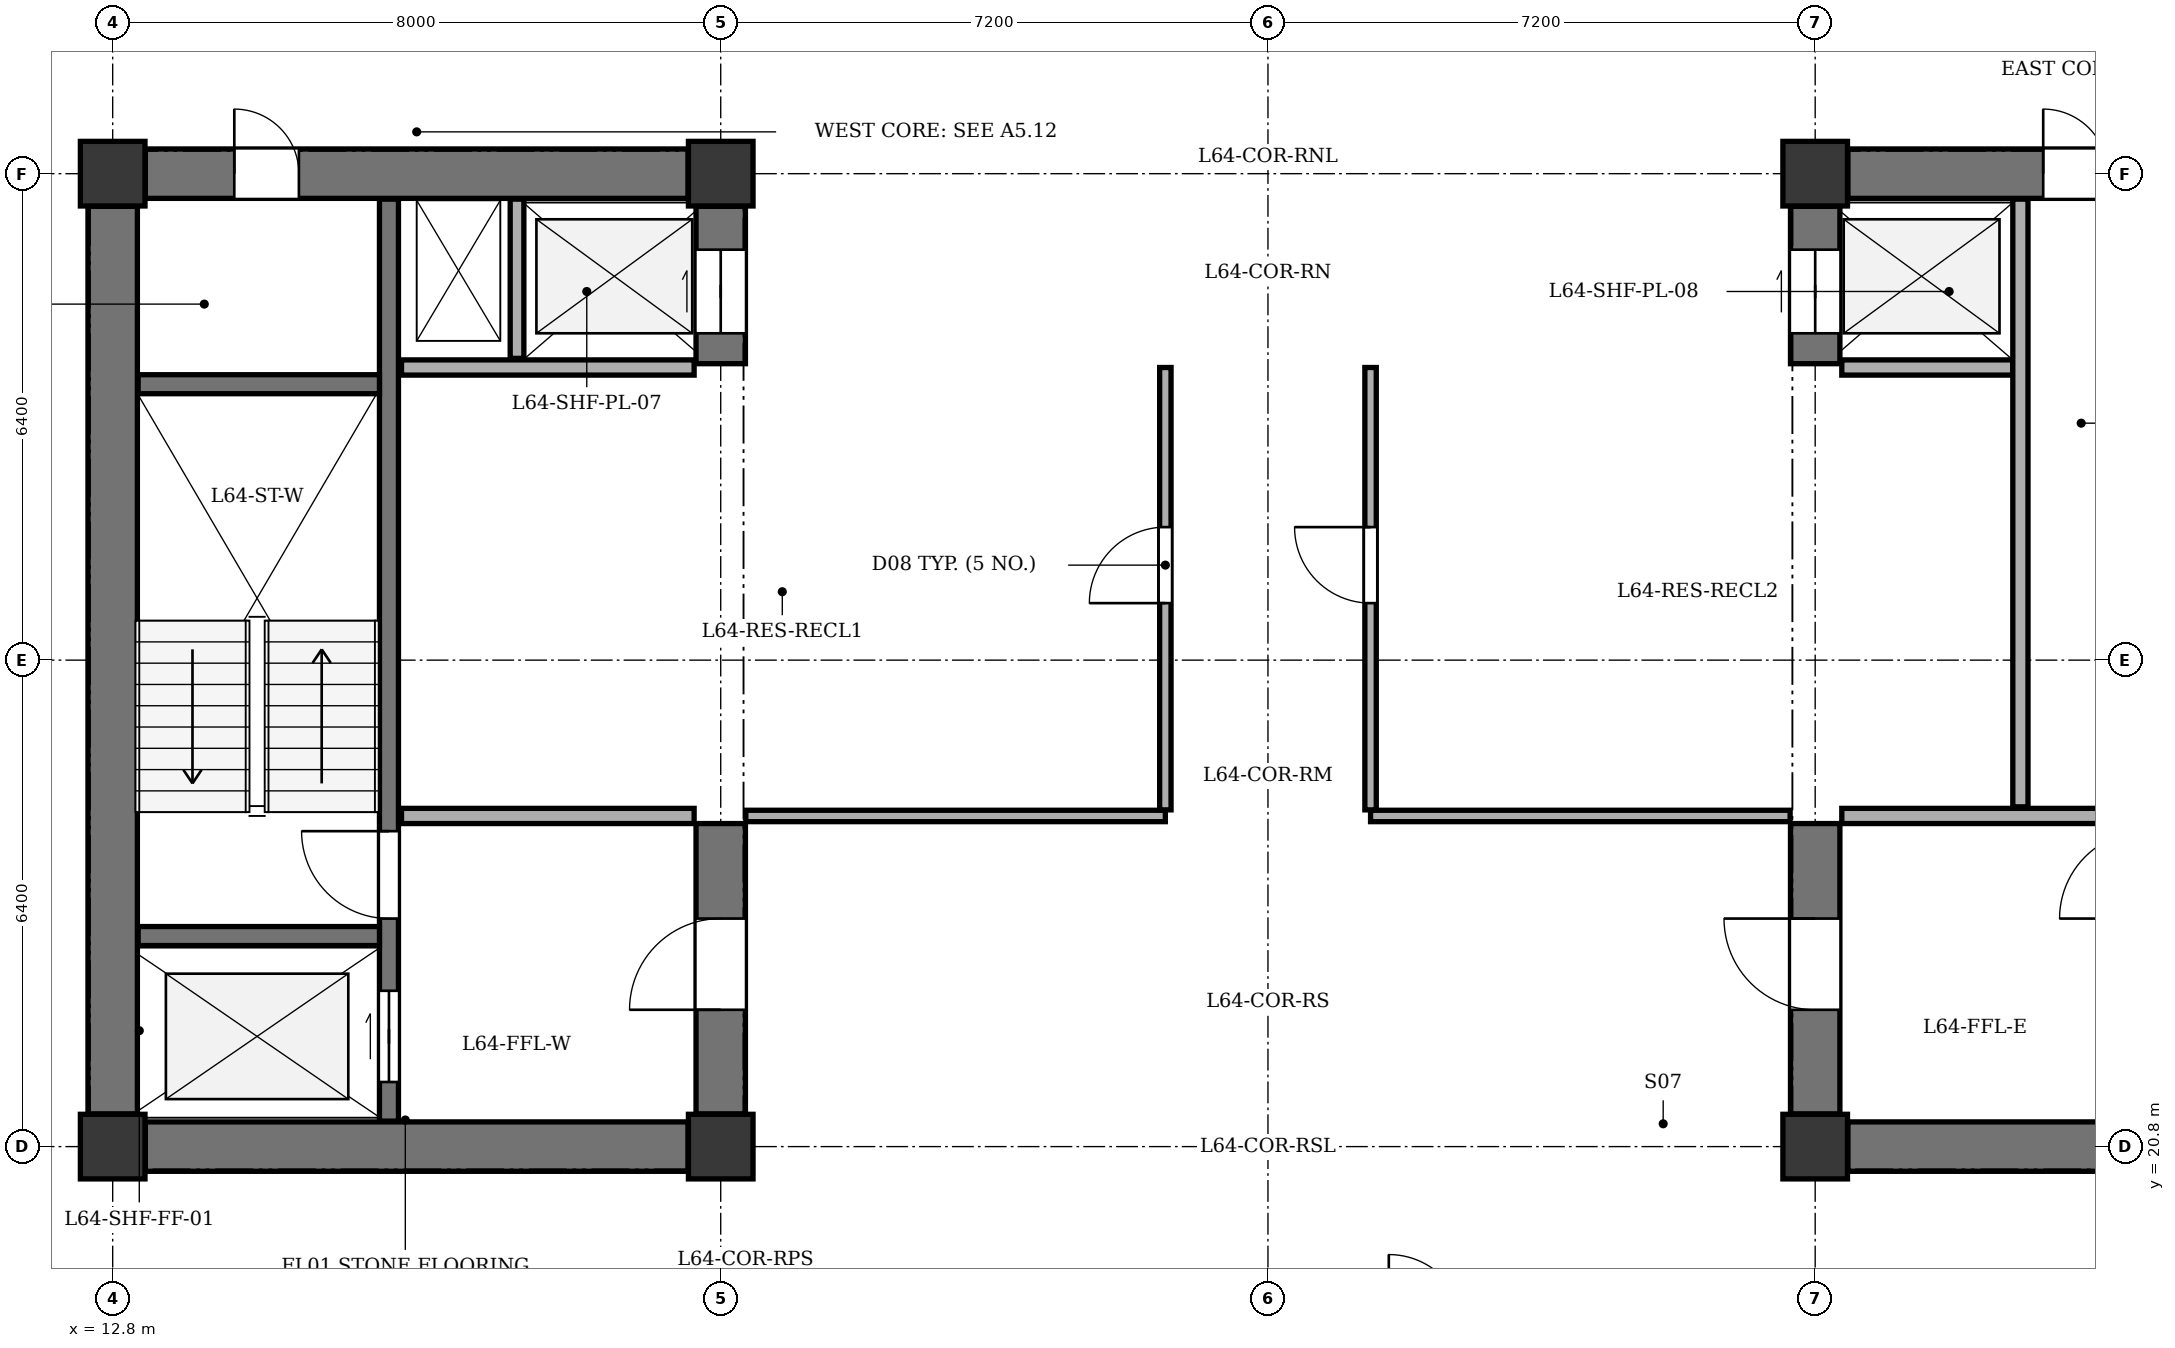
"""IFC4 building model, lengths in metres.
Left out: names, types, materials, properties, quantities, classifications, styles, units other than length and angle.
Written with IfcOpenShell. Run it as: python <this file> out.ifc"""

import sys

from ifc_helpers import new_model, si_unit, direction, frame, frame_2d, origin, origin_2d, place, context, subcontext, project, spatial, rectangle, extrude, element, fill, save


model = new_model("IFC4")
c1 = context("Model", 3, precision=1e-05, world=origin(), true_north=direction((0.0, 1.0)))
c2 = subcontext(c1, "Body", "Model", "MODEL_VIEW")
j1 = project(units=[si_unit("LENGTHUNIT", "METRE"), si_unit("PLANEANGLEUNIT", "RADIAN")], contexts=[c1])
p1 = place(None, origin())
s1 = spatial("IfcSite", under=j1, at=p1, CompositionType="ELEMENT")
p2 = place(p1, origin())
s2 = spatial("IfcBuilding", under=s1, at=p2, CompositionType="ELEMENT")
p3 = place(p2, frame((0.0, 0.0, 244.9)))
s3 = spatial("IfcBuildingStorey", under=s2, at=p3, CompositionType="ELEMENT", Elevation=244.9)
for number, where, z_axis, x_axis in (
    (1, (12.8, 20.8, 0.0), (0.0, 0.0, 1.0), (1.0, 0.0, 0.0)),
    (2, (20.8, 20.8, 0.0), (0.0, 0.0, 1.0), (1.0, 0.0, 0.0)),
    (3, (12.8, 33.6, 0.0), (0.0, 0.0, 1.0), (1.0, 0.0, 0.0)),
    (4, (20.8, 33.6, 0.0), (0.0, 0.0, 1.0), (1.0, 0.0, 0.0)),
    (5, (35.2, 20.8, 0.0), (0.0, 0.0, 1.0), (1.0, 0.0, 0.0)),
    (6, (35.2, 33.6, 0.0), (0.0, 0.0, 1.0), (1.0, 0.0, 0.0)),
):
    element("IfcColumn", number, at=place(p3, frame(where, z_axis=z_axis, x_axis=x_axis)), inside=s3, PredefinedType="COLUMN", context=c2, shape_type="SweptSolid", body=[
        extrude(rectangle(XDim=0.85, YDim=0.85, at=origin_2d()), origin(), (0.0, 0.0, 1.0), 3.4),
    ])
p4 = place(p3, frame((10.88, 35.0, 0.0), z_axis=(0.0, 0.0, 1.0), x_axis=(0.707106781187, 0.707106781187, 0.0)))
e7 = element("IfcWall", 7, at=p4, inside=s3, PredefinedType="STANDARD", context=c2, shape_type="SweptSolid", body=[
    extrude(rectangle(XDim=6.11, YDim=0.32, at=frame_2d((3.055, 0.0))), origin(), (0.0, 0.0, 1.0), 2.335),
])
p5 = place(p4, frame((2.355, 0.0, 0.75)))
e8 = element("IfcOpeningElement", 8, at=p5, cuts=e7, PredefinedType="OPENING", context=c2, shape_type="SweptSolid", body=[
    extrude(rectangle(XDim=1.4, YDim=1.465, at=frame_2d((0.7, 0.732))), frame((0.0, 0.17, 0.0), z_axis=(0.0, -1.0, 0.0), x_axis=(1.0, 0.0, 0.0)), (0.0, 0.0, 1.0), 0.34),
])
p6 = place(p3, frame((12.8, 21.23, 0.0), z_axis=(0.0, 0.0, 1.0), x_axis=(0.0, 1.0, 0.0)))
e9 = element("IfcWall", 9, at=p6, inside=s3, PredefinedType="SHEAR", context=c2, shape_type="SweptSolid", body=[
    extrude(rectangle(XDim=11.94, YDim=0.65, at=frame_2d((5.97, 0.0))), origin(), (0.0, 0.0, 1.0), 2.95),
])
p7 = place(p3, frame((13.23, 20.8, 0.0), z_axis=(0.0, 0.0, 1.0), x_axis=(1.0, 0.0, 0.0)))
e10 = element("IfcWall", 10, at=p7, inside=s3, PredefinedType="SHEAR", context=c2, shape_type="SweptSolid", body=[
    extrude(rectangle(XDim=7.14, YDim=0.65, at=frame_2d((3.57, 0.0))), origin(), (0.0, 0.0, 1.0), 2.95),
])
p8 = place(p3, frame((13.23, 33.6, 0.0), z_axis=(0.0, 0.0, 1.0), x_axis=(1.0, 0.0, 0.0)))
e11 = element("IfcWall", 11, at=p8, inside=s3, PredefinedType="SHEAR", context=c2, shape_type="SweptSolid", body=[
    extrude(rectangle(XDim=7.14, YDim=0.65, at=frame_2d((3.57, 0.0))), origin(), (0.0, 0.0, 1.0), 2.95),
])
p9 = place(p8, frame((1.17, 0.0, 0.0)))
e12 = element("IfcOpeningElement", 12, at=p9, cuts=e11, PredefinedType="OPENING", context=c2, shape_type="SweptSolid", body=[
    extrude(rectangle(XDim=0.85, YDim=2.02, at=frame_2d((0.425, 1.01))), frame((0.0, 0.335, 0.0), z_axis=(0.0, -1.0, 0.0), x_axis=(1.0, 0.0, 0.0)), (0.0, 0.0, 1.0), 0.67),
])
p10 = place(p3, frame((20.8, 21.23, 0.0), z_axis=(0.0, 0.0, 1.0), x_axis=(0.0, 1.0, 0.0)))
e13 = element("IfcWall", 13, at=p10, inside=s3, PredefinedType="SHEAR", context=c2, shape_type="SweptSolid", body=[
    extrude(rectangle(XDim=3.82, YDim=0.65, at=frame_2d((1.91, 0.0))), origin(), (0.0, 0.0, 1.0), 2.95),
])
p11 = place(p10, frame((1.37, 0.0, 0.0)))
e14 = element("IfcOpeningElement", 14, at=p11, cuts=e13, PredefinedType="OPENING", context=c2, shape_type="SweptSolid", body=[
    extrude(rectangle(XDim=1.2, YDim=2.15, at=frame_2d((0.6, 1.075))), frame((0.0, 0.335, 0.0), z_axis=(0.0, -1.0, 0.0), x_axis=(1.0, 0.0, 0.0)), (0.0, 0.0, 1.0), 0.67),
])
p12 = place(p3, frame((20.8, 31.1, 0.0), z_axis=(0.0, 0.0, 1.0), x_axis=(0.0, 1.0, 0.0)))
e15 = element("IfcWall", 15, at=p12, inside=s3, PredefinedType="SHEAR", context=c2, shape_type="SweptSolid", body=[
    extrude(rectangle(XDim=2.07, YDim=0.65, at=frame_2d((1.035, 0.0))), origin(), (0.0, 0.0, 1.0), 2.95),
])
p13 = place(p12, frame((0.4, 0.0, 0.0)))
e16 = element("IfcOpeningElement", 16, at=p13, cuts=e15, PredefinedType="OPENING", context=c2, shape_type="SweptSolid", body=[
    extrude(rectangle(XDim=1.1, YDim=2.1, at=frame_2d((0.55, 1.05))), frame((0.0, 0.335, 0.0), z_axis=(0.0, -1.0, 0.0), x_axis=(1.0, 0.0, 0.0)), (0.0, 0.0, 1.0), 0.67),
])
p14 = place(p3, frame((16.435, 21.135, 0.0), z_axis=(0.0, 0.0, 1.0), x_axis=(0.0, 1.0, 0.0)))
e17 = element("IfcWall", 17, at=p14, inside=s3, PredefinedType="SHEAR", context=c2, shape_type="SweptSolid", body=[
    extrude(rectangle(XDim=12.13, YDim=0.25, at=frame_2d((6.065, 0.0))), origin(), (0.0, 0.0, 1.0), 2.95),
])
p15 = place(p14, frame((0.515, 0.0, 0.0)))
e18 = element("IfcOpeningElement", 18, at=p15, cuts=e17, PredefinedType="OPENING", context=c2, shape_type="SweptSolid", body=[
    extrude(rectangle(XDim=1.2, YDim=2.15, at=frame_2d((0.6, 1.075))), frame((0.0, 0.135, 0.0), z_axis=(0.0, -1.0, 0.0), x_axis=(1.0, 0.0, 0.0)), (0.0, 0.0, 1.0), 0.27),
])
p16 = place(p14, frame((2.665, 0.0, 0.0)))
e19 = element("IfcOpeningElement", 19, at=p16, cuts=e17, PredefinedType="OPENING", context=c2, shape_type="SweptSolid", body=[
    extrude(rectangle(XDim=1.15, YDim=2.15, at=frame_2d((0.575, 1.075))), frame((0.0, 0.135, 0.0), z_axis=(0.0, -1.0, 0.0), x_axis=(1.0, 0.0, 0.0)), (0.0, 0.0, 1.0), 0.27),
])
for number, where, z_axis, x_axis in (
    (20, (13.135, 23.57, 0.0), (0.0, 0.0, 1.0), (1.0, 0.0, 0.0)),
    (21, (13.135, 30.83, 0.0), (0.0, 0.0, 1.0), (1.0, 0.0, 0.0)),
):
    element("IfcWall", number, at=place(p3, frame(where, z_axis=z_axis, x_axis=x_axis)), inside=s3, PredefinedType="SHEAR", context=c2, shape_type="SweptSolid", body=[
        extrude(rectangle(XDim=3.175, YDim=0.25, at=frame_2d((1.587, 0.0))), origin(), (0.0, 0.0, 1.0), 2.95),
    ])
for number, where, z_axis, x_axis in (
    (22, (16.6, 25.15, 0.0), (0.0, 0.0, 1.0), (1.0, 0.0, 0.0)),
    (23, (16.6, 31.05, 0.0), (0.0, 0.0, 1.0), (1.0, 0.0, 0.0)),
):
    element("IfcWall", number, at=place(p3, frame(where, z_axis=z_axis, x_axis=x_axis)), inside=s3, PredefinedType="SOLIDWALL", context=c2, shape_type="SweptSolid", body=[
        extrude(rectangle(XDim=3.85, YDim=0.2, at=frame_2d((1.925, 0.0))), origin(), (0.0, 0.0, 1.0), 2.95),
    ])
p17 = place(p3, frame((18.12, 31.17, 0.0), z_axis=(0.0, 0.0, 1.0), x_axis=(0.0, 1.0, 0.0)))
e24 = element("IfcWall", 24, at=p17, inside=s3, PredefinedType="PARTITIONING", context=c2, shape_type="SweptSolid", body=[
    extrude(rectangle(XDim=2.095, YDim=0.18, at=frame_2d((1.047, 0.0))), origin(), (0.0, 0.0, 1.0), 2.95),
])
p18 = place(p3, frame((35.63, 20.8, 0.0), z_axis=(0.0, 0.0, 1.0), x_axis=(1.0, 0.0, 0.0)))
e25 = element("IfcWall", 25, at=p18, inside=s3, PredefinedType="SHEAR", context=c2, shape_type="SweptSolid", body=[
    extrude(rectangle(XDim=7.14, YDim=0.65, at=frame_2d((3.57, 0.0))), origin(), (0.0, 0.0, 1.0), 2.95),
])
p19 = place(p3, frame((35.63, 33.6, 0.0), z_axis=(0.0, 0.0, 1.0), x_axis=(1.0, 0.0, 0.0)))
e26 = element("IfcWall", 26, at=p19, inside=s3, PredefinedType="SHEAR", context=c2, shape_type="SweptSolid", body=[
    extrude(rectangle(XDim=7.14, YDim=0.65, at=frame_2d((3.57, 0.0))), origin(), (0.0, 0.0, 1.0), 2.95),
])
p20 = place(p19, frame((4.77, 0.0, 0.0)))
e27 = element("IfcOpeningElement", 27, at=p20, cuts=e26, PredefinedType="OPENING", context=c2, shape_type="SweptSolid", body=[
    extrude(rectangle(XDim=1.3, YDim=2.15, at=frame_2d((0.65, 1.075))), frame((0.0, 0.335, 0.0), z_axis=(0.0, -1.0, 0.0), x_axis=(1.0, 0.0, 0.0)), (0.0, 0.0, 1.0), 0.67),
])
p21 = place(p19, frame((2.57, 0.0, 0.0)))
e28 = element("IfcOpeningElement", 28, at=p21, cuts=e26, PredefinedType="OPENING", context=c2, shape_type="SweptSolid", body=[
    extrude(rectangle(XDim=0.85, YDim=2.02, at=frame_2d((0.425, 1.01))), frame((0.0, 0.335, 0.0), z_axis=(0.0, -1.0, 0.0), x_axis=(1.0, 0.0, 0.0)), (0.0, 0.0, 1.0), 0.67),
])
p22 = place(p3, frame((35.2, 21.23, 0.0), z_axis=(0.0, 0.0, 1.0), x_axis=(0.0, 1.0, 0.0)))
e29 = element("IfcWall", 29, at=p22, inside=s3, PredefinedType="SHEAR", context=c2, shape_type="SweptSolid", body=[
    extrude(rectangle(XDim=3.82, YDim=0.65, at=frame_2d((1.91, 0.0))), origin(), (0.0, 0.0, 1.0), 2.95),
])
p23 = place(p22, frame((1.37, 0.0, 0.0)))
e30 = element("IfcOpeningElement", 30, at=p23, cuts=e29, PredefinedType="OPENING", context=c2, shape_type="SweptSolid", body=[
    extrude(rectangle(XDim=1.2, YDim=2.15, at=frame_2d((0.6, 1.075))), frame((0.0, 0.335, 0.0), z_axis=(0.0, -1.0, 0.0), x_axis=(1.0, 0.0, 0.0)), (0.0, 0.0, 1.0), 0.67),
])
p24 = place(p3, frame((35.2, 31.1, 0.0), z_axis=(0.0, 0.0, 1.0), x_axis=(0.0, 1.0, 0.0)))
e31 = element("IfcWall", 31, at=p24, inside=s3, PredefinedType="SHEAR", context=c2, shape_type="SweptSolid", body=[
    extrude(rectangle(XDim=2.07, YDim=0.65, at=frame_2d((1.035, 0.0))), origin(), (0.0, 0.0, 1.0), 2.95),
])
p25 = place(p24, frame((0.4, 0.0, 0.0)))
e32 = element("IfcOpeningElement", 32, at=p25, cuts=e31, PredefinedType="OPENING", context=c2, shape_type="SweptSolid", body=[
    extrude(rectangle(XDim=1.1, YDim=2.1, at=frame_2d((0.55, 1.05))), frame((0.0, 0.335, 0.0), z_axis=(0.0, -1.0, 0.0), x_axis=(1.0, 0.0, 0.0)), (0.0, 0.0, 1.0), 0.67),
])
p26 = place(p3, frame((35.55, 25.15, 0.0), z_axis=(0.0, 0.0, 1.0), x_axis=(1.0, 0.0, 0.0)))
e33 = element("IfcWall", 33, at=p26, inside=s3, PredefinedType="SOLIDWALL", context=c2, shape_type="SweptSolid", body=[
    extrude(rectangle(XDim=3.85, YDim=0.2, at=frame_2d((1.925, 0.0))), origin(), (0.0, 0.0, 1.0), 2.95),
])
p27 = place(p3, frame((35.55, 31.05, 0.0), z_axis=(0.0, 0.0, 1.0), x_axis=(1.0, 0.0, 0.0)))
e34 = element("IfcWall", 34, at=p27, inside=s3, PredefinedType="SOLIDWALL", context=c2, shape_type="SweptSolid", body=[
    extrude(rectangle(XDim=2.25, YDim=0.2, at=frame_2d((1.125, 0.0))), origin(), (0.0, 0.0, 1.0), 2.95),
])
p28 = place(p3, frame((37.9, 25.27, 0.0), z_axis=(0.0, 0.0, 1.0), x_axis=(0.0, 1.0, 0.0)))
e35 = element("IfcWall", 35, at=p28, inside=s3, PredefinedType="SOLIDWALL", context=c2, shape_type="SweptSolid", body=[
    extrude(rectangle(XDim=7.995, YDim=0.2, at=frame_2d((3.998, 0.0))), origin(), (0.0, 0.0, 1.0), 2.95),
])
for number, where, z_axis, x_axis in (
    (36, (21.13, 25.15, 0.0), (0.0, 0.0, 1.0), (1.0, 0.0, 0.0)),
    (37, (29.35, 25.15, 0.0), (0.0, 0.0, 1.0), (1.0, 0.0, 0.0)),
):
    element("IfcWall", number, at=place(p3, frame(where, z_axis=z_axis, x_axis=x_axis)), inside=s3, PredefinedType="PARTITIONING", context=c2, shape_type="SweptSolid", body=[
        extrude(rectangle(XDim=5.52, YDim=0.15, at=frame_2d((2.76, 0.0))), origin(), (0.0, 0.0, 1.0), 2.95),
    ])
p29 = place(p3, frame((26.65, 25.23, 0.0), z_axis=(0.0, 0.0, 1.0), x_axis=(0.0, 1.0, 0.0)))
e38 = element("IfcWall", 38, at=p29, inside=s3, PredefinedType="PARTITIONING", context=c2, shape_type="SweptSolid", body=[
    extrude(rectangle(XDim=5.82, YDim=0.15, at=frame_2d((2.91, 0.0))), origin(), (0.0, 0.0, 1.0), 2.95),
])
p30 = place(p29, frame((2.72, 0.0, 0.0)))
e39 = element("IfcOpeningElement", 39, at=p30, cuts=e38, PredefinedType="OPENING", context=c2, shape_type="SweptSolid", body=[
    extrude(rectangle(XDim=1.0, YDim=2.1, at=frame_2d((0.5, 1.05))), frame((0.0, 0.085, 0.0), z_axis=(0.0, -1.0, 0.0), x_axis=(1.0, 0.0, 0.0)), (0.0, 0.0, 1.0), 0.17),
])
p31 = place(p3, frame((29.35, 25.23, 0.0), z_axis=(0.0, 0.0, 1.0), x_axis=(0.0, 1.0, 0.0)))
e40 = element("IfcWall", 40, at=p31, inside=s3, PredefinedType="PARTITIONING", context=c2, shape_type="SweptSolid", body=[
    extrude(rectangle(XDim=5.82, YDim=0.15, at=frame_2d((2.91, 0.0))), origin(), (0.0, 0.0, 1.0), 2.95),
])
p32 = place(p31, frame((2.72, 0.0, 0.0)))
e41 = element("IfcOpeningElement", 41, at=p32, cuts=e40, PredefinedType="OPENING", context=c2, shape_type="SweptSolid", body=[
    extrude(rectangle(XDim=1.0, YDim=2.1, at=frame_2d((0.5, 1.05))), frame((0.0, 0.085, 0.0), z_axis=(0.0, -1.0, 0.0), x_axis=(1.0, 0.0, 0.0)), (0.0, 0.0, 1.0), 0.17),
])
p33 = place(p9, origin())
e42 = element("IfcDoor", 42, at=p33, inside=s3, OperationType="SINGLE_SWING_LEFT", PredefinedType="DOOR", context=c2, shape_type="SweptSolid", body=[
    extrude(rectangle(XDim=0.85, YDim=2.02, at=frame_2d((0.425, 1.01))), frame((0.0, 0.025, 0.0), z_axis=(0.0, -1.0, 0.0), x_axis=(1.0, 0.0, 0.0)), (0.0, 0.0, 1.0), 0.05),
])
fill(e12, e42)
p34 = place(p11, origin())
e43 = element("IfcDoor", 43, at=p34, inside=s3, OperationType="SINGLE_SWING_LEFT", PredefinedType="DOOR", context=c2, shape_type="SweptSolid", body=[
    extrude(rectangle(XDim=1.2, YDim=2.15, at=frame_2d((0.6, 1.075))), frame((0.0, 0.025, 0.0), z_axis=(0.0, -1.0, 0.0), x_axis=(1.0, 0.0, 0.0)), (0.0, 0.0, 1.0), 0.05),
])
fill(e14, e43)
p35 = place(p13, origin())
e44 = element("IfcDoor", 44, at=p35, inside=s3, OperationType="DOUBLE_DOOR_SLIDING", PredefinedType="DOOR", context=c2, shape_type="SweptSolid", body=[
    extrude(rectangle(XDim=1.1, YDim=2.1, at=frame_2d((0.55, 1.05))), frame((0.0, 0.025, 0.0), z_axis=(0.0, -1.0, 0.0), x_axis=(1.0, 0.0, 0.0)), (0.0, 0.0, 1.0), 0.05),
])
fill(e16, e44)
p36 = place(p15, origin())
e45 = element("IfcDoor", 45, at=p36, inside=s3, OperationType="DOUBLE_DOOR_SLIDING", PredefinedType="DOOR", context=c2, shape_type="SweptSolid", body=[
    extrude(rectangle(XDim=1.2, YDim=2.15, at=frame_2d((0.6, 1.075))), frame((0.0, 0.025, 0.0), z_axis=(0.0, -1.0, 0.0), x_axis=(1.0, 0.0, 0.0)), (0.0, 0.0, 1.0), 0.05),
])
fill(e18, e45)
p37 = place(p16, origin())
e46 = element("IfcDoor", 46, at=p37, inside=s3, OperationType="SINGLE_SWING_RIGHT", PredefinedType="DOOR", context=c2, shape_type="SweptSolid", body=[
    extrude(rectangle(XDim=1.15, YDim=2.15, at=frame_2d((0.575, 1.075))), frame((0.0, 0.025, 0.0), z_axis=(0.0, -1.0, 0.0), x_axis=(1.0, 0.0, 0.0)), (0.0, 0.0, 1.0), 0.05),
])
fill(e19, e46)
p38 = place(p21, origin())
e47 = element("IfcDoor", 47, at=p38, inside=s3, OperationType="SINGLE_SWING_LEFT", PredefinedType="DOOR", context=c2, shape_type="SweptSolid", body=[
    extrude(rectangle(XDim=0.85, YDim=2.02, at=frame_2d((0.425, 1.01))), frame((0.0, 0.025, 0.0), z_axis=(0.0, -1.0, 0.0), x_axis=(1.0, 0.0, 0.0)), (0.0, 0.0, 1.0), 0.05),
])
fill(e28, e47)
p39 = place(p23, origin())
e48 = element("IfcDoor", 48, at=p39, inside=s3, OperationType="SINGLE_SWING_RIGHT", PredefinedType="DOOR", context=c2, shape_type="SweptSolid", body=[
    extrude(rectangle(XDim=1.2, YDim=2.15, at=frame_2d((0.6, 1.075))), frame((0.0, 0.025, 0.0), z_axis=(0.0, -1.0, 0.0), x_axis=(1.0, 0.0, 0.0)), (0.0, 0.0, 1.0), 0.05),
])
fill(e30, e48)
p40 = place(p25, origin())
e49 = element("IfcDoor", 49, at=p40, inside=s3, OperationType="DOUBLE_DOOR_SLIDING", PredefinedType="DOOR", context=c2, shape_type="SweptSolid", body=[
    extrude(rectangle(XDim=1.1, YDim=2.1, at=frame_2d((0.55, 1.05))), frame((0.0, 0.025, 0.0), z_axis=(0.0, -1.0, 0.0), x_axis=(1.0, 0.0, 0.0)), (0.0, 0.0, 1.0), 0.05),
])
fill(e32, e49)
p41 = place(p30, origin())
e50 = element("IfcDoor", 50, at=p41, inside=s3, OperationType="SINGLE_SWING_LEFT", PredefinedType="DOOR", context=c2, shape_type="SweptSolid", body=[
    extrude(rectangle(XDim=1.0, YDim=2.1, at=frame_2d((0.5, 1.05))), frame((0.0, 0.025, 0.0), z_axis=(0.0, -1.0, 0.0), x_axis=(1.0, 0.0, 0.0)), (0.0, 0.0, 1.0), 0.05),
])
fill(e39, e50)
p42 = place(p32, origin())
e51 = element("IfcDoor", 51, at=p42, inside=s3, OperationType="SINGLE_SWING_RIGHT", PredefinedType="DOOR", context=c2, shape_type="SweptSolid", body=[
    extrude(rectangle(XDim=1.0, YDim=2.1, at=frame_2d((0.5, 1.05))), frame((0.0, 0.025, 0.0), z_axis=(0.0, -1.0, 0.0), x_axis=(1.0, 0.0, 0.0)), (0.0, 0.0, 1.0), 0.05),
])
fill(e41, e51)
save(model, sys.argv[1])
